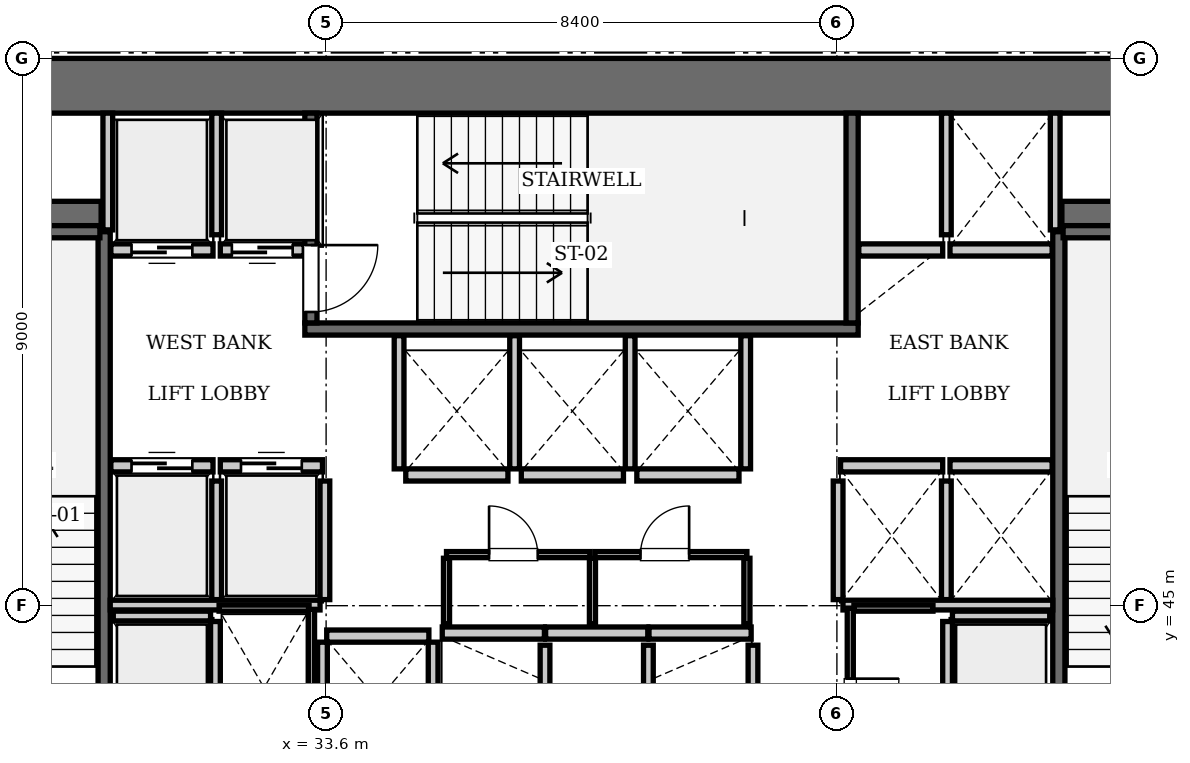
"""IFC4 building model, lengths in metres.
Left out: names, types, materials, properties, quantities, classifications, styles, units other than length and angle.
Written with IfcOpenShell. Run it as: python <this file> out.ifc"""

import sys

from ifc_helpers import new_model, si_unit, direction, frame, frame_2d, origin, place, context, subcontext, project, spatial, rectangle, extrude, element, fill, save


model = new_model("IFC4")
c1 = context("Model", 3, precision=1e-05, world=origin(), true_north=direction((0.0, 1.0)))
c2 = subcontext(c1, "Body", "Model", "MODEL_VIEW")
j1 = project(units=[si_unit("LENGTHUNIT", "METRE"), si_unit("PLANEANGLEUNIT", "RADIAN")], contexts=[c1])
p1 = place(None, origin())
s1 = spatial("IfcSite", under=j1, at=p1, CompositionType="ELEMENT")
p2 = place(p1, origin())
s2 = spatial("IfcBuilding", under=s1, at=p2, CompositionType="ELEMENT")
p3 = place(p2, frame((0.0, 0.0, 50.05)))
s3 = spatial("IfcBuildingStorey", under=s2, at=p3, CompositionType="ELEMENT", Elevation=50.05)
p4 = place(p3, frame((25.2, 53.55, 0.0), z_axis=(0.0, 0.0, 1.0), x_axis=(1.0, 0.0, 0.0)))
e1 = element("IfcWall", 1, at=p4, inside=s3, PredefinedType="SHEAR", context=c2, shape_type="SweptSolid", body=[
    extrude(rectangle(XDim=25.2, YDim=0.9, at=frame_2d((12.6, 0.0))), origin(), (0.0, 0.0, 1.0), 3.85),
])
p5 = place(p3, frame((26.1, 51.4, 0.0), z_axis=(0.0, 0.0, 1.0), x_axis=(1.0, 0.0, 0.0)))
e2 = element("IfcWall", 2, at=p5, inside=s3, PredefinedType="SHEAR", context=c2, shape_type="SweptSolid", body=[
    extrude(rectangle(XDim=3.8, YDim=0.5, at=frame_2d((1.9, 0.0))), origin(), (0.0, 0.0, 1.0), 3.85),
])
p6 = place(p3, frame((45.7, 51.4, 0.0), z_axis=(0.0, 0.0, 1.0), x_axis=(1.0, 0.0, 0.0)))
e3 = element("IfcWall", 3, at=p6, inside=s3, PredefinedType="SHEAR", context=c2, shape_type="SweptSolid", body=[
    extrude(rectangle(XDim=3.8, YDim=0.5, at=frame_2d((1.9, 0.0))), origin(), (0.0, 0.0, 1.0), 3.85),
])
p7 = place(p3, frame((29.95, 42.3, 0.0), z_axis=(0.0, 0.0, 1.0), x_axis=(0.0, 1.0, 0.0)))
e4 = element("IfcWall", 4, at=p7, inside=s3, PredefinedType="SOLIDWALL", context=c2, shape_type="SweptSolid", body=[
    extrude(rectangle(XDim=8.85, YDim=0.2, at=frame_2d((4.425, 0.0))), origin(), (0.0, 0.0, 1.0), 3.61),
])
p8 = place(p3, frame((26.38, 51.15, 0.0), z_axis=(0.0, 0.0, 1.0), x_axis=(1.0, 0.0, 0.0)))
e5 = element("IfcWall", 5, at=p8, inside=s3, PredefinedType="SOLIDWALL", context=c2, shape_type="SweptSolid", body=[
    extrude(rectangle(XDim=3.5, YDim=0.2, at=frame_2d((1.75, 0.0))), origin(), (0.0, 0.0, 1.0), 3.61),
])
p9 = place(p3, frame((33.25, 49.55, 0.0), z_axis=(0.0, 0.0, 1.0), x_axis=(1.0, 0.0, 0.0)))
e6 = element("IfcWall", 6, at=p9, inside=s3, PredefinedType="SOLIDWALL", context=c2, shape_type="SweptSolid", body=[
    extrude(rectangle(XDim=9.1, YDim=0.2, at=frame_2d((4.55, 0.0))), origin(), (0.0, 0.0, 1.0), 3.61),
])
p10 = place(p3, frame((42.25, 49.65, 0.0), z_axis=(0.0, 0.0, 1.0), x_axis=(0.0, 1.0, 0.0)))
e7 = element("IfcWall", 7, at=p10, inside=s3, PredefinedType="SOLIDWALL", context=c2, shape_type="SweptSolid", body=[
    extrude(rectangle(XDim=3.45, YDim=0.2, at=frame_2d((1.725, 0.0))), origin(), (0.0, 0.0, 1.0), 3.61),
])
p11 = place(p3, frame((33.35, 49.65, 0.0), z_axis=(0.0, 0.0, 1.0), x_axis=(0.0, 1.0, 0.0)))
e8 = element("IfcWall", 8, at=p11, inside=s3, PredefinedType="SOLIDWALL", context=c2, shape_type="SweptSolid", body=[
    extrude(rectangle(XDim=3.45, YDim=0.2, at=frame_2d((1.725, 0.0))), origin(), (0.0, 0.0, 1.0), 3.61),
])
p12 = place(p11, frame((0.18, 0.0, 0.0)))
e9 = element("IfcOpeningElement", 9, at=p12, cuts=e8, PredefinedType="OPENING", context=c2, shape_type="SweptSolid", body=[
    extrude(rectangle(XDim=1.1, YDim=2.15, at=frame_2d((0.55, 1.075))), frame((0.0, 0.11, 0.0), z_axis=(0.0, -1.0, 0.0), x_axis=(1.0, 0.0, 0.0)), (0.0, 0.0, 1.0), 0.22),
])
p13 = place(p3, frame((45.65, 42.3, 0.0), z_axis=(0.0, 0.0, 1.0), x_axis=(0.0, 1.0, 0.0)))
e10 = element("IfcWall", 10, at=p13, inside=s3, PredefinedType="SOLIDWALL", context=c2, shape_type="SweptSolid", body=[
    extrude(rectangle(XDim=8.85, YDim=0.2, at=frame_2d((4.425, 0.0))), origin(), (0.0, 0.0, 1.0), 3.61),
])
p14 = place(p3, frame((45.72, 51.15, 0.0), z_axis=(0.0, 0.0, 1.0), x_axis=(1.0, 0.0, 0.0)))
e11 = element("IfcWall", 11, at=p14, inside=s3, PredefinedType="SOLIDWALL", context=c2, shape_type="SweptSolid", body=[
    extrude(rectangle(XDim=3.5, YDim=0.2, at=frame_2d((1.75, 0.0))), origin(), (0.0, 0.0, 1.0), 3.61),
])
p15 = place(p3, frame((30.06, 47.3, 0.0), z_axis=(0.0, 0.0, 1.0), x_axis=(1.0, 0.0, 0.0)))
e12 = element("IfcWall", 12, at=p15, inside=s3, PredefinedType="SOLIDWALL", context=c2, shape_type="SweptSolid", body=[
    extrude(rectangle(XDim=1.68, YDim=0.2, at=frame_2d((0.84, 0.0))), origin(), (0.0, 0.0, 1.0), 3.61),
])
p16 = place(p15, frame((0.34, 0.0, 0.0)))
e13 = element("IfcOpeningElement", 13, at=p16, cuts=e12, PredefinedType="OPENING", context=c2, shape_type="SweptSolid", body=[
    extrude(rectangle(XDim=1.0, YDim=2.15, at=frame_2d((0.5, 1.075))), frame((0.0, 0.11, 0.0), z_axis=(0.0, -1.0, 0.0), x_axis=(1.0, 0.0, 0.0)), (0.0, 0.0, 1.0), 0.22),
])
p17 = place(p3, frame((31.86, 47.3, 0.0), z_axis=(0.0, 0.0, 1.0), x_axis=(1.0, 0.0, 0.0)))
e14 = element("IfcWall", 14, at=p17, inside=s3, PredefinedType="SOLIDWALL", context=c2, shape_type="SweptSolid", body=[
    extrude(rectangle(XDim=1.68, YDim=0.2, at=frame_2d((0.84, 0.0))), origin(), (0.0, 0.0, 1.0), 3.61),
])
p18 = place(p17, frame((0.34, 0.0, 0.0)))
e15 = element("IfcOpeningElement", 15, at=p18, cuts=e14, PredefinedType="OPENING", context=c2, shape_type="SweptSolid", body=[
    extrude(rectangle(XDim=1.0, YDim=2.15, at=frame_2d((0.5, 1.075))), frame((0.0, 0.11, 0.0), z_axis=(0.0, -1.0, 0.0), x_axis=(1.0, 0.0, 0.0)), (0.0, 0.0, 1.0), 0.22),
])
p19 = place(p3, frame((30.06, 50.85, 0.0), z_axis=(0.0, 0.0, 1.0), x_axis=(1.0, 0.0, 0.0)))
e16 = element("IfcWall", 16, at=p19, inside=s3, PredefinedType="SOLIDWALL", context=c2, shape_type="SweptSolid", body=[
    extrude(rectangle(XDim=1.68, YDim=0.2, at=frame_2d((0.84, 0.0))), origin(), (0.0, 0.0, 1.0), 3.61),
])
p20 = place(p19, frame((0.34, 0.0, 0.0)))
e17 = element("IfcOpeningElement", 17, at=p20, cuts=e16, PredefinedType="OPENING", context=c2, shape_type="SweptSolid", body=[
    extrude(rectangle(XDim=1.0, YDim=2.15, at=frame_2d((0.5, 1.075))), frame((0.0, 0.11, 0.0), z_axis=(0.0, -1.0, 0.0), x_axis=(1.0, 0.0, 0.0)), (0.0, 0.0, 1.0), 0.22),
])
p21 = place(p3, frame((31.86, 50.85, 0.0), z_axis=(0.0, 0.0, 1.0), x_axis=(1.0, 0.0, 0.0)))
e18 = element("IfcWall", 18, at=p21, inside=s3, PredefinedType="SOLIDWALL", context=c2, shape_type="SweptSolid", body=[
    extrude(rectangle(XDim=1.38, YDim=0.2, at=frame_2d((0.69, 0.0))), origin(), (0.0, 0.0, 1.0), 3.61),
])
p22 = place(p21, frame((0.19, 0.0, 0.0)))
e19 = element("IfcOpeningElement", 19, at=p22, cuts=e18, PredefinedType="OPENING", context=c2, shape_type="SweptSolid", body=[
    extrude(rectangle(XDim=1.0, YDim=2.15, at=frame_2d((0.5, 1.075))), frame((0.0, 0.11, 0.0), z_axis=(0.0, -1.0, 0.0), x_axis=(1.0, 0.0, 0.0)), (0.0, 0.0, 1.0), 0.22),
])
for number, where, z_axis, x_axis in (
    (20, (42.06, 47.3, 0.0), (0.0, 0.0, 1.0), (1.0, 0.0, 0.0)),
    (21, (43.86, 47.3, 0.0), (0.0, 0.0, 1.0), (1.0, 0.0, 0.0)),
):
    element("IfcWall", number, at=place(p3, frame(where, z_axis=z_axis, x_axis=x_axis)), inside=s3, PredefinedType="SOLIDWALL", context=c2, shape_type="SweptSolid", body=[
        extrude(rectangle(XDim=1.68, YDim=0.2, at=frame_2d((0.84, 0.0))), origin(), (0.0, 0.0, 1.0), 3.61),
    ])
p23 = place(p3, frame((42.36, 50.85, 0.0), z_axis=(0.0, 0.0, 1.0), x_axis=(1.0, 0.0, 0.0)))
e22 = element("IfcWall", 22, at=p23, inside=s3, PredefinedType="SOLIDWALL", context=c2, shape_type="SweptSolid", body=[
    extrude(rectangle(XDim=1.38, YDim=0.2, at=frame_2d((0.69, 0.0))), origin(), (0.0, 0.0, 1.0), 3.61),
])
for number, where, z_axis, x_axis in (
    (23, (43.86, 50.85, 0.0), (0.0, 0.0, 1.0), (1.0, 0.0, 0.0)),
    (24, (35.51, 44.55, 0.0), (0.0, 0.0, 1.0), (1.0, 0.0, 0.0)),
    (25, (37.21, 44.55, 0.0), (0.0, 0.0, 1.0), (1.0, 0.0, 0.0)),
):
    element("IfcWall", number, at=place(p3, frame(where, z_axis=z_axis, x_axis=x_axis)), inside=s3, PredefinedType="SOLIDWALL", context=c2, shape_type="SweptSolid", body=[
        extrude(rectangle(XDim=1.68, YDim=0.2, at=frame_2d((0.84, 0.0))), origin(), (0.0, 0.0, 1.0), 3.61),
    ])
for number, where, z_axis, x_axis in (
    (26, (38.91, 44.55, 0.0), (0.0, 0.0, 1.0), (1.0, 0.0, 0.0)),
    (27, (34.91, 47.15, 0.0), (0.0, 0.0, 1.0), (1.0, 0.0, 0.0)),
):
    element("IfcWall", number, at=place(p3, frame(where, z_axis=z_axis, x_axis=x_axis)), inside=s3, PredefinedType="SOLIDWALL", context=c2, shape_type="SweptSolid", body=[
        extrude(rectangle(XDim=1.68, YDim=0.2, at=frame_2d((0.84, 0.0))), origin(), (0.0, 0.0, 1.0), 3.61),
    ])
for number, where, z_axis, x_axis in (
    (28, (36.81, 47.15, 0.0), (0.0, 0.0, 1.0), (1.0, 0.0, 0.0)),
    (29, (38.71, 47.15, 0.0), (0.0, 0.0, 1.0), (1.0, 0.0, 0.0)),
    (30, (33.61, 44.5, 0.0), (0.0, 0.0, 1.0), (1.0, 0.0, 0.0)),
):
    element("IfcWall", number, at=place(p3, frame(where, z_axis=z_axis, x_axis=x_axis)), inside=s3, PredefinedType="SOLIDWALL", context=c2, shape_type="SweptSolid", body=[
        extrude(rectangle(XDim=1.68, YDim=0.2, at=frame_2d((0.84, 0.0))), origin(), (0.0, 0.0, 1.0), 3.61),
    ])
p24 = place(p3, frame((30.1, 44.83, 0.0), z_axis=(0.0, 0.0, 1.0), x_axis=(1.0, 0.0, 0.0)))
e31 = element("IfcWall", 31, at=p24, inside=s3, PredefinedType="SOLIDWALL", context=c2, shape_type="SweptSolid", body=[
    extrude(rectangle(XDim=1.6, YDim=0.16, at=frame_2d((0.8, 0.0))), origin(), (0.0, 0.0, 1.0), 3.61),
])
p25 = place(p3, frame((31.78, 42.3, 0.0), z_axis=(0.0, 0.0, 1.0), x_axis=(0.0, 1.0, 0.0)))
e32 = element("IfcWall", 32, at=p25, inside=s3, PredefinedType="SOLIDWALL", context=c2, shape_type="SweptSolid", body=[
    extrude(rectangle(XDim=2.44, YDim=0.16, at=frame_2d((1.22, 0.0))), origin(), (0.0, 0.0, 1.0), 3.61),
])
p26 = place(p3, frame((43.9, 44.83, 0.0), z_axis=(0.0, 0.0, 1.0), x_axis=(1.0, 0.0, 0.0)))
e33 = element("IfcWall", 33, at=p26, inside=s3, PredefinedType="SOLIDWALL", context=c2, shape_type="SweptSolid", body=[
    extrude(rectangle(XDim=1.6, YDim=0.16, at=frame_2d((0.8, 0.0))), origin(), (0.0, 0.0, 1.0), 3.61),
])
p27 = place(p3, frame((43.82, 42.3, 0.0), z_axis=(0.0, 0.0, 1.0), x_axis=(0.0, 1.0, 0.0)))
e34 = element("IfcWall", 34, at=p27, inside=s3, PredefinedType="SOLIDWALL", context=c2, shape_type="SweptSolid", body=[
    extrude(rectangle(XDim=2.44, YDim=0.16, at=frame_2d((1.22, 0.0))), origin(), (0.0, 0.0, 1.0), 3.61),
])
for number, where, z_axis, x_axis in (
    (35, (31.8, 45.1, 0.0), (0.0, 0.0, 1.0), (0.0, 1.0, 0.0)),
    (36, (33.58, 45.1, 0.0), (0.0, 0.0, 1.0), (0.0, 1.0, 0.0)),
):
    element("IfcWall", number, at=place(p3, frame(where, z_axis=z_axis, x_axis=x_axis)), inside=s3, PredefinedType="SOLIDWALL", context=c2, shape_type="SweptSolid", body=[
        extrude(rectangle(XDim=1.95, YDim=0.16, at=frame_2d((0.975, 0.0))), origin(), (0.0, 0.0, 1.0), 3.61),
    ])
p28 = place(p3, frame((30.05, 45.01, 0.0), z_axis=(0.0, 0.0, 1.0), x_axis=(1.0, 0.0, 0.0)))
e37 = element("IfcWall", 37, at=p28, inside=s3, PredefinedType="SOLIDWALL", context=c2, shape_type="SweptSolid", body=[
    extrude(rectangle(XDim=3.45, YDim=0.16, at=frame_2d((1.725, 0.0))), origin(), (0.0, 0.0, 1.0), 3.61),
])
p29 = place(p3, frame((30.01, 51.18, 0.0), z_axis=(0.0, 0.0, 1.0), x_axis=(0.0, 1.0, 0.0)))
e38 = element("IfcWall", 38, at=p29, inside=s3, PredefinedType="SOLIDWALL", context=c2, shape_type="SweptSolid", body=[
    extrude(rectangle(XDim=1.92, YDim=0.16, at=frame_2d((0.96, 0.0))), origin(), (0.0, 0.0, 1.0), 3.61),
])
p30 = place(p3, frame((31.8, 51.1, 0.0), z_axis=(0.0, 0.0, 1.0), x_axis=(0.0, 1.0, 0.0)))
e39 = element("IfcWall", 39, at=p30, inside=s3, PredefinedType="SOLIDWALL", context=c2, shape_type="SweptSolid", body=[
    extrude(rectangle(XDim=2.0, YDim=0.16, at=frame_2d((1.0, 0.0))), origin(), (0.0, 0.0, 1.0), 3.61),
])
for number, where, z_axis, x_axis in (
    (40, (42.02, 45.1, 0.0), (0.0, 0.0, 1.0), (0.0, 1.0, 0.0)),
    (41, (43.8, 45.1, 0.0), (0.0, 0.0, 1.0), (0.0, 1.0, 0.0)),
):
    element("IfcWall", number, at=place(p3, frame(where, z_axis=z_axis, x_axis=x_axis)), inside=s3, PredefinedType="SOLIDWALL", context=c2, shape_type="SweptSolid", body=[
        extrude(rectangle(XDim=1.95, YDim=0.16, at=frame_2d((0.975, 0.0))), origin(), (0.0, 0.0, 1.0), 3.61),
    ])
p31 = place(p3, frame((42.1, 45.01, 0.0), z_axis=(0.0, 0.0, 1.0), x_axis=(1.0, 0.0, 0.0)))
e42 = element("IfcWall", 42, at=p31, inside=s3, PredefinedType="SOLIDWALL", context=c2, shape_type="SweptSolid", body=[
    extrude(rectangle(XDim=3.45, YDim=0.16, at=frame_2d((1.725, 0.0))), origin(), (0.0, 0.0, 1.0), 3.61),
])
p32 = place(p3, frame((45.59, 51.18, 0.0), z_axis=(0.0, 0.0, 1.0), x_axis=(0.0, 1.0, 0.0)))
e43 = element("IfcWall", 43, at=p32, inside=s3, PredefinedType="SOLIDWALL", context=c2, shape_type="SweptSolid", body=[
    extrude(rectangle(XDim=1.92, YDim=0.16, at=frame_2d((0.96, 0.0))), origin(), (0.0, 0.0, 1.0), 3.61),
])
p33 = place(p3, frame((43.8, 51.1, 0.0), z_axis=(0.0, 0.0, 1.0), x_axis=(0.0, 1.0, 0.0)))
e44 = element("IfcWall", 44, at=p33, inside=s3, PredefinedType="SOLIDWALL", context=c2, shape_type="SweptSolid", body=[
    extrude(rectangle(XDim=2.0, YDim=0.16, at=frame_2d((1.0, 0.0))), origin(), (0.0, 0.0, 1.0), 3.61),
])
for number, where, z_axis, x_axis in (
    (45, (37.2, 42.3, 0.0), (0.0, 0.0, 1.0), (0.0, 1.0, 0.0)),
    (46, (38.9, 42.3, 0.0), (0.0, 0.0, 1.0), (0.0, 1.0, 0.0)),
    (47, (40.62, 42.3, 0.0), (0.0, 0.0, 1.0), (0.0, 1.0, 0.0)),
):
    element("IfcWall", number, at=place(p3, frame(where, z_axis=z_axis, x_axis=x_axis)), inside=s3, PredefinedType="SOLIDWALL", context=c2, shape_type="SweptSolid", body=[
        extrude(rectangle(XDim=2.05, YDim=0.16, at=frame_2d((1.025, 0.0))), origin(), (0.0, 0.0, 1.0), 3.61),
    ])
for number, where, z_axis, x_axis in (
    (48, (34.8, 47.25, 0.0), (0.0, 0.0, 1.0), (0.0, 1.0, 0.0)),
    (49, (36.7, 47.25, 0.0), (0.0, 0.0, 1.0), (0.0, 1.0, 0.0)),
    (50, (38.6, 47.25, 0.0), (0.0, 0.0, 1.0), (0.0, 1.0, 0.0)),
    (51, (40.5, 47.25, 0.0), (0.0, 0.0, 1.0), (0.0, 1.0, 0.0)),
):
    element("IfcWall", number, at=place(p3, frame(where, z_axis=z_axis, x_axis=x_axis)), inside=s3, PredefinedType="SOLIDWALL", context=c2, shape_type="SweptSolid", body=[
        extrude(rectangle(XDim=2.19, YDim=0.16, at=frame_2d((1.095, 0.0))), origin(), (0.0, 0.0, 1.0), 3.61),
    ])
for number, where, z_axis, x_axis in (
    (52, (33.54, 42.3, 0.0), (0.0, 0.0, 1.0), (0.0, 1.0, 0.0)),
    (53, (35.36, 42.3, 0.0), (0.0, 0.0, 1.0), (0.0, 1.0, 0.0)),
):
    element("IfcWall", number, at=place(p3, frame(where, z_axis=z_axis, x_axis=x_axis)), inside=s3, PredefinedType="SOLIDWALL", context=c2, shape_type="SweptSolid", body=[
        extrude(rectangle(XDim=2.1, YDim=0.16, at=frame_2d((1.05, 0.0))), origin(), (0.0, 0.0, 1.0), 3.61),
    ])
p34 = place(p3, frame((31.84, 44.96, 0.0), z_axis=(0.0, 0.0, 1.0), x_axis=(1.0, 0.0, 0.0)))
e54 = element("IfcWall", 54, at=p34, inside=s3, PredefinedType="PARTITIONING", context=c2, shape_type="SweptSolid", body=[
    extrude(rectangle(XDim=1.48, YDim=0.1, at=frame_2d((0.74, 0.0))), origin(), (0.0, 0.0, 1.0), 3.61),
])
p35 = place(p3, frame((33.36, 42.36, 0.0), z_axis=(0.0, 0.0, 1.0), x_axis=(0.0, 1.0, 0.0)))
e55 = element("IfcWall", 55, at=p35, inside=s3, PredefinedType="PARTITIONING", context=c2, shape_type="SweptSolid", body=[
    extrude(rectangle(XDim=2.58, YDim=0.1, at=frame_2d((1.29, 0.0))), origin(), (0.0, 0.0, 1.0), 3.61),
])
p36 = place(p3, frame((35.58, 45.84, 0.0), z_axis=(0.0, 0.0, 1.0), x_axis=(1.0, 0.0, 0.0)))
e56 = element("IfcWall", 56, at=p36, inside=s3, PredefinedType="PARTITIONING", context=c2, shape_type="SweptSolid", body=[
    extrude(rectangle(XDim=2.36, YDim=0.1, at=frame_2d((1.18, 0.0))), origin(), (0.0, 0.0, 1.0), 3.61),
])
p37 = place(p36, frame((0.7, 0.0, 0.0)))
e57 = element("IfcOpeningElement", 57, at=p37, cuts=e56, PredefinedType="OPENING", context=c2, shape_type="SweptSolid", body=[
    extrude(rectangle(XDim=0.8, YDim=2.05, at=frame_2d((0.4, 1.025))), frame((0.0, 0.06, 0.0), z_axis=(0.0, -1.0, 0.0), x_axis=(1.0, 0.0, 0.0)), (0.0, 0.0, 1.0), 0.12),
])
p38 = place(p3, frame((38.02, 45.84, 0.0), z_axis=(0.0, 0.0, 1.0), x_axis=(1.0, 0.0, 0.0)))
e58 = element("IfcWall", 58, at=p38, inside=s3, PredefinedType="PARTITIONING", context=c2, shape_type="SweptSolid", body=[
    extrude(rectangle(XDim=2.5, YDim=0.1, at=frame_2d((1.25, 0.0))), origin(), (0.0, 0.0, 1.0), 3.61),
])
p39 = place(p38, frame((0.75, 0.0, 0.0)))
e59 = element("IfcOpeningElement", 59, at=p39, cuts=e58, PredefinedType="OPENING", context=c2, shape_type="SweptSolid", body=[
    extrude(rectangle(XDim=0.8, YDim=2.05, at=frame_2d((0.4, 1.025))), frame((0.0, 0.06, 0.0), z_axis=(0.0, -1.0, 0.0), x_axis=(1.0, 0.0, 0.0)), (0.0, 0.0, 1.0), 0.12),
])
for number, where, z_axis, x_axis in (
    (60, (35.58, 44.7, 0.0), (0.0, 0.0, 1.0), (0.0, 1.0, 0.0)),
    (61, (37.98, 44.7, 0.0), (0.0, 0.0, 1.0), (0.0, 1.0, 0.0)),
    (62, (40.52, 44.7, 0.0), (0.0, 0.0, 1.0), (0.0, 1.0, 0.0)),
):
    element("IfcWall", number, at=place(p3, frame(where, z_axis=z_axis, x_axis=x_axis)), inside=s3, PredefinedType="PARTITIONING", context=c2, shape_type="SweptSolid", body=[
        extrude(rectangle(XDim=1.08, YDim=0.1, at=frame_2d((0.54, 0.0))), origin(), (0.0, 0.0, 1.0), 3.61),
    ])
p40 = place(p3, frame((42.22, 42.35, 0.0), z_axis=(0.0, 0.0, 1.0), x_axis=(0.0, 1.0, 0.0)))
e63 = element("IfcWall", 63, at=p40, inside=s3, PredefinedType="PARTITIONING", context=c2, shape_type="SweptSolid", body=[
    extrude(rectangle(XDim=2.61, YDim=0.1, at=frame_2d((1.305, 0.0))), origin(), (0.0, 0.0, 1.0), 3.61),
])
p41 = place(p40, frame((0.65, 0.0, 0.0)))
e64 = element("IfcOpeningElement", 64, at=p41, cuts=e63, PredefinedType="OPENING", context=c2, shape_type="SweptSolid", body=[
    extrude(rectangle(XDim=0.8, YDim=2.05, at=frame_2d((0.4, 1.025))), frame((0.0, 0.06, 0.0), z_axis=(0.0, -1.0, 0.0), x_axis=(1.0, 0.0, 0.0)), (0.0, 0.0, 1.0), 0.12),
])
p42 = place(p3, frame((42.28, 44.96, 0.0), z_axis=(0.0, 0.0, 1.0), x_axis=(1.0, 0.0, 0.0)))
e65 = element("IfcWall", 65, at=p42, inside=s3, PredefinedType="PARTITIONING", context=c2, shape_type="SweptSolid", body=[
    extrude(rectangle(XDim=1.3, YDim=0.1, at=frame_2d((0.65, 0.0))), origin(), (0.0, 0.0, 1.0), 3.61),
])
p43 = place(p12, frame((1.1, 0.0, 0.0), z_axis=(0.0, 0.0, 1.0), x_axis=(-1.0, 0.0, 0.0)))
e66 = element("IfcDoor", 66, at=p43, inside=s3, OperationType="SINGLE_SWING_LEFT", PredefinedType="DOOR", context=c2, shape_type="SweptSolid", body=[
    extrude(rectangle(XDim=1.1, YDim=2.15, at=frame_2d((0.55, 1.075))), frame((0.0, 0.025, 0.0), z_axis=(0.0, -1.0, 0.0), x_axis=(1.0, 0.0, 0.0)), (0.0, 0.0, 1.0), 0.05),
])
fill(e9, e66)
p44 = place(p16, origin())
e67 = element("IfcDoor", 67, at=p44, inside=s3, OperationType="SLIDING_TO_LEFT", PredefinedType="DOOR", context=c2, shape_type="SweptSolid", body=[
    extrude(rectangle(XDim=1.0, YDim=2.15, at=frame_2d((0.5, 1.075))), frame((0.0, 0.025, 0.0), z_axis=(0.0, -1.0, 0.0), x_axis=(1.0, 0.0, 0.0)), (0.0, 0.0, 1.0), 0.05),
])
fill(e13, e67)
p45 = place(p18, origin())
e68 = element("IfcDoor", 68, at=p45, inside=s3, OperationType="SLIDING_TO_LEFT", PredefinedType="DOOR", context=c2, shape_type="SweptSolid", body=[
    extrude(rectangle(XDim=1.0, YDim=2.15, at=frame_2d((0.5, 1.075))), frame((0.0, 0.025, 0.0), z_axis=(0.0, -1.0, 0.0), x_axis=(1.0, 0.0, 0.0)), (0.0, 0.0, 1.0), 0.05),
])
fill(e15, e68)
p46 = place(p20, frame((1.0, 0.0, 0.0), z_axis=(0.0, 0.0, 1.0), x_axis=(-1.0, 0.0, 0.0)))
e69 = element("IfcDoor", 69, at=p46, inside=s3, OperationType="SLIDING_TO_LEFT", PredefinedType="DOOR", context=c2, shape_type="SweptSolid", body=[
    extrude(rectangle(XDim=1.0, YDim=2.15, at=frame_2d((0.5, 1.075))), frame((0.0, 0.025, 0.0), z_axis=(0.0, -1.0, 0.0), x_axis=(1.0, 0.0, 0.0)), (0.0, 0.0, 1.0), 0.05),
])
fill(e17, e69)
p47 = place(p22, frame((1.0, 0.0, 0.0), z_axis=(0.0, 0.0, 1.0), x_axis=(-1.0, 0.0, 0.0)))
e70 = element("IfcDoor", 70, at=p47, inside=s3, OperationType="SLIDING_TO_LEFT", PredefinedType="DOOR", context=c2, shape_type="SweptSolid", body=[
    extrude(rectangle(XDim=1.0, YDim=2.15, at=frame_2d((0.5, 1.075))), frame((0.0, 0.025, 0.0), z_axis=(0.0, -1.0, 0.0), x_axis=(1.0, 0.0, 0.0)), (0.0, 0.0, 1.0), 0.05),
])
fill(e19, e70)
p48 = place(p37, origin())
e71 = element("IfcDoor", 71, at=p48, inside=s3, OperationType="SINGLE_SWING_LEFT", PredefinedType="DOOR", context=c2, shape_type="SweptSolid", body=[
    extrude(rectangle(XDim=0.8, YDim=2.05, at=frame_2d((0.4, 1.025))), frame((0.0, 0.025, 0.0), z_axis=(0.0, -1.0, 0.0), x_axis=(1.0, 0.0, 0.0)), (0.0, 0.0, 1.0), 0.05),
])
fill(e57, e71)
p49 = place(p39, origin())
e72 = element("IfcDoor", 72, at=p49, inside=s3, OperationType="SINGLE_SWING_RIGHT", PredefinedType="DOOR", context=c2, shape_type="SweptSolid", body=[
    extrude(rectangle(XDim=0.8, YDim=2.05, at=frame_2d((0.4, 1.025))), frame((0.0, 0.025, 0.0), z_axis=(0.0, -1.0, 0.0), x_axis=(1.0, 0.0, 0.0)), (0.0, 0.0, 1.0), 0.05),
])
fill(e59, e72)
p50 = place(p41, frame((0.8, 0.0, 0.0), z_axis=(0.0, 0.0, 1.0), x_axis=(-1.0, 0.0, 0.0)))
e73 = element("IfcDoor", 73, at=p50, inside=s3, OperationType="SINGLE_SWING_LEFT", PredefinedType="DOOR", context=c2, shape_type="SweptSolid", body=[
    extrude(rectangle(XDim=0.8, YDim=2.05, at=frame_2d((0.4, 1.025))), frame((0.0, 0.025, 0.0), z_axis=(0.0, -1.0, 0.0), x_axis=(1.0, 0.0, 0.0)), (0.0, 0.0, 1.0), 0.05),
])
fill(e64, e73)
save(model, sys.argv[1])
